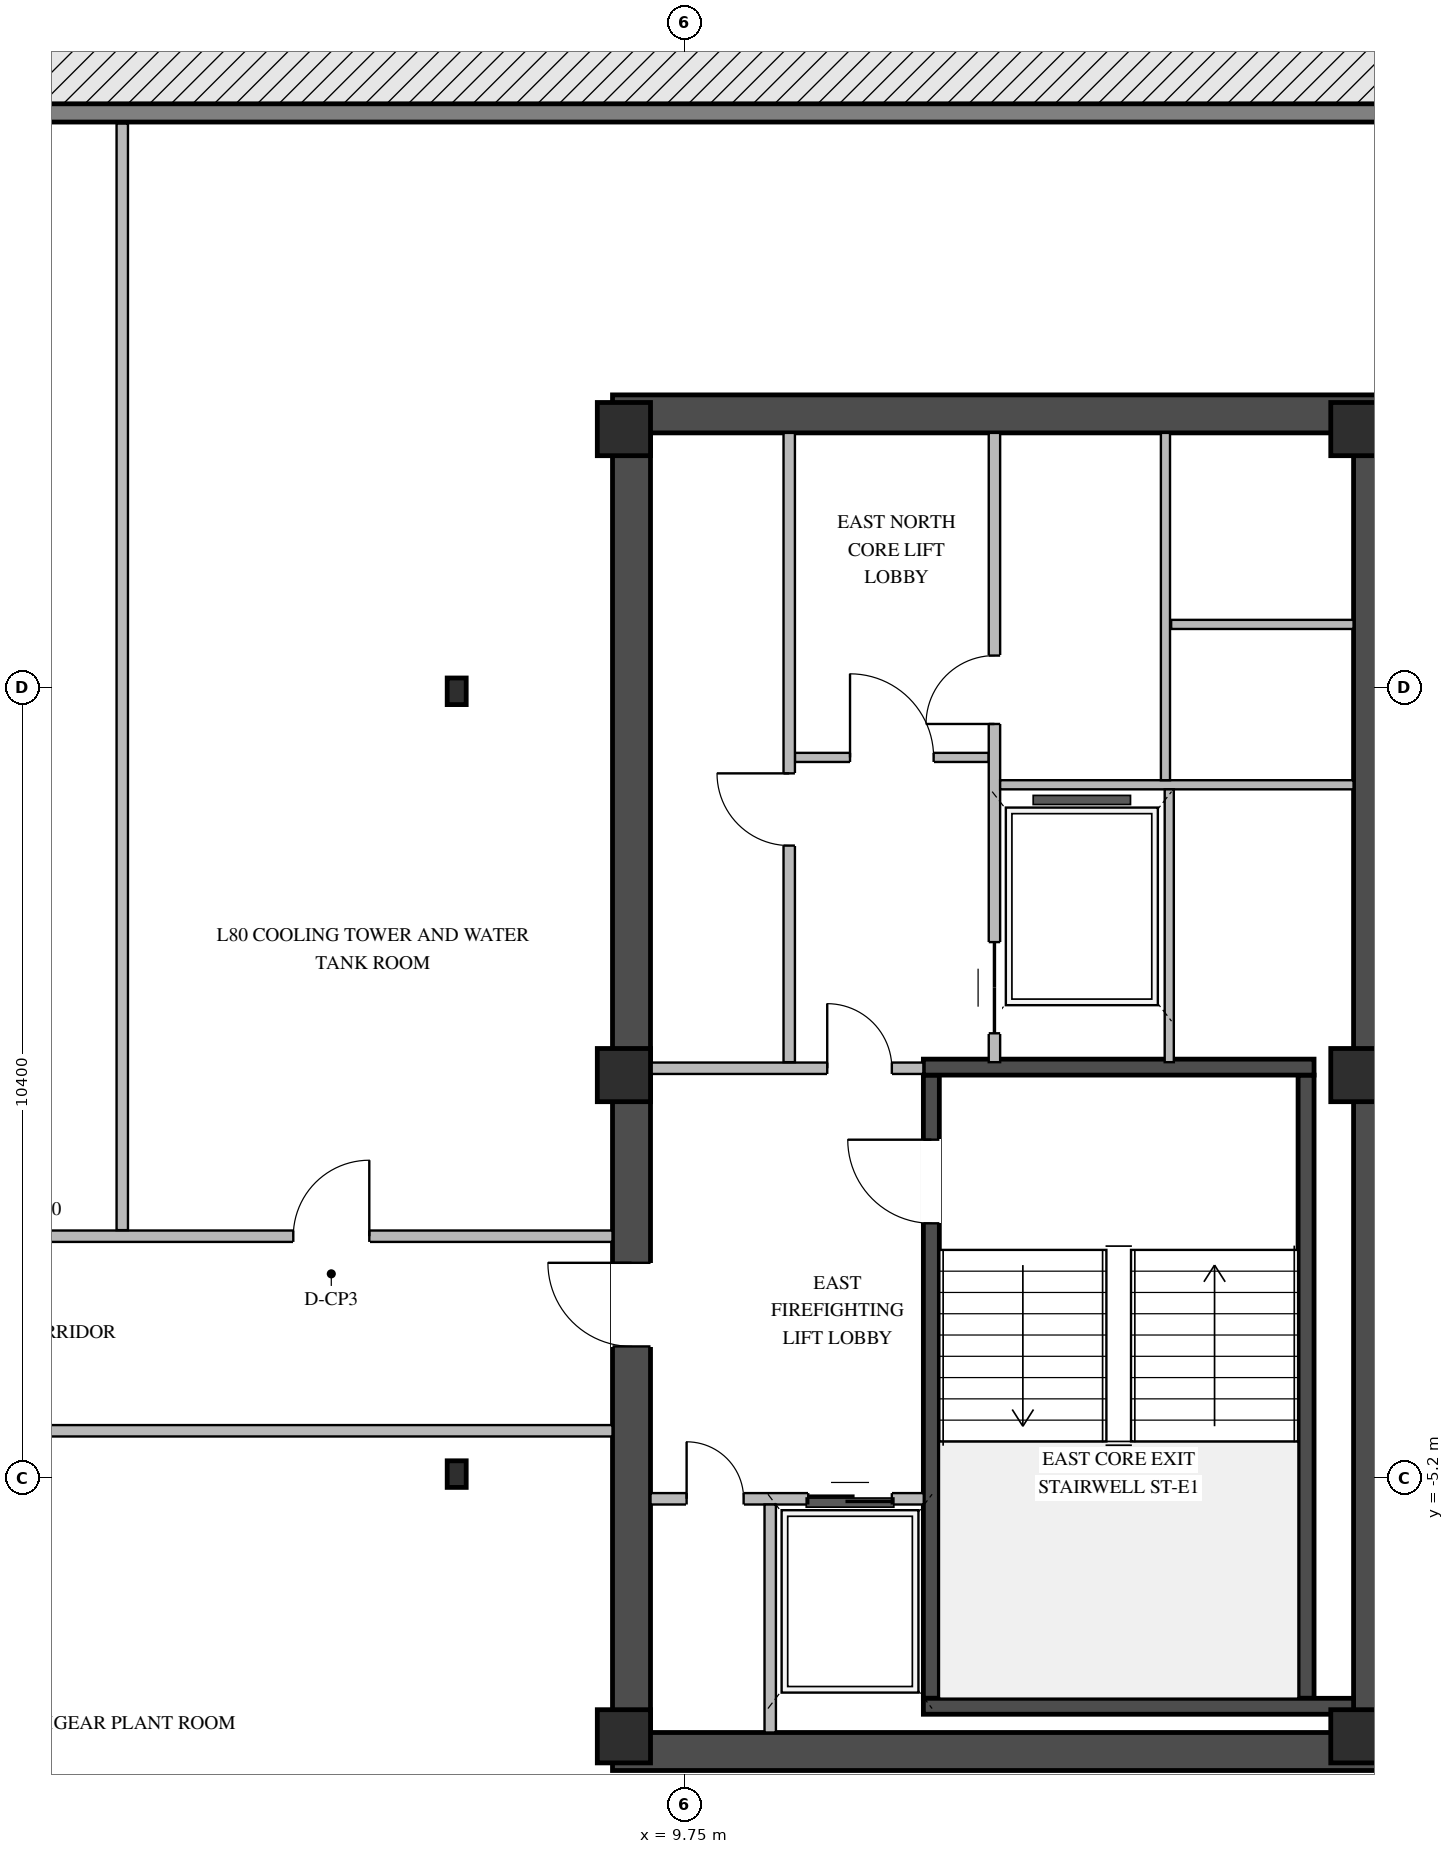
"""IFC4 building model, lengths in metres.
Left out: names, types, materials, properties, quantities, classifications, styles, units other than length and angle.
Written with IfcOpenShell. Run it as: python <this file> out.ifc"""

import sys

from ifc_helpers import new_model, si_unit, direction, frame, frame_2d, origin, origin_2d, place, context, subcontext, project, spatial, rectangle, i_section, extrude, element, fill, save


model = new_model("IFC4")
c1 = context("Model", 3, precision=1e-05, world=origin(), true_north=direction((0.0, 1.0)))
c2 = subcontext(c1, "Body", "Model", "MODEL_VIEW")
j1 = project(units=[si_unit("LENGTHUNIT", "METRE"), si_unit("PLANEANGLEUNIT", "RADIAN")], contexts=[c1])
p1 = place(None, origin())
s1 = spatial("IfcSite", under=j1, at=p1, CompositionType="ELEMENT")
p2 = place(p1, origin())
s2 = spatial("IfcBuilding", under=s1, at=p2, CompositionType="ELEMENT")
p3 = place(p2, frame((0.0, 0.0, 294.15)))
s3 = spatial("IfcBuildingStorey", under=s2, at=p3, CompositionType="ELEMENT", Elevation=294.15)
for number, where, z_axis, x_axis in (
    (1, (8.8, -8.8, 0.0), (0.0, 0.0, 1.0), (1.0, 0.0, 0.0)),
    (2, (8.8, 8.8, 0.0), (0.0, 0.0, 1.0), (1.0, 0.0, 0.0)),
):
    element("IfcWall", number, at=place(p3, frame(where, z_axis=z_axis, x_axis=x_axis)), inside=s3, PredefinedType="SHEAR", context=c2, shape_type="SweptSolid", body=[
        extrude(rectangle(XDim=10.25, YDim=0.5, at=frame_2d((5.125, 0.0))), origin(), (0.0, 0.0, 1.0), 3.35),
    ])
p4 = place(p3, frame((9.05, -8.55, 0.0), z_axis=(0.0, 0.0, 1.0), x_axis=(0.0, 1.0, 0.0)))
e3 = element("IfcWall", 3, at=p4, inside=s3, PredefinedType="SHEAR", context=c2, shape_type="SweptSolid", body=[
    extrude(rectangle(XDim=17.1, YDim=0.5, at=frame_2d((8.55, 0.0))), origin(), (0.0, 0.0, 1.0), 3.35),
])
p5 = place(p4, frame((5.08, 0.0, 0.0)))
e4 = element("IfcOpeningElement", 4, at=p5, cuts=e3, PredefinedType="OPENING", context=c2, shape_type="SweptSolid", body=[
    extrude(rectangle(XDim=1.1, YDim=2.08, at=frame_2d((0.55, 1.04))), frame((0.0, 0.26, 0.0), z_axis=(0.0, -1.0, 0.0), x_axis=(1.0, 0.0, 0.0)), (0.0, 0.0, 1.0), 0.52),
])
p6 = place(p3, frame((18.8, -8.55, 0.0), z_axis=(0.0, 0.0, 1.0), x_axis=(0.0, 1.0, 0.0)))
e5 = element("IfcWall", 5, at=p6, inside=s3, PredefinedType="SHEAR", context=c2, shape_type="SweptSolid", body=[
    extrude(rectangle(XDim=17.1, YDim=0.5, at=frame_2d((8.55, 0.0))), origin(), (0.0, 0.0, 1.0), 3.35),
])
p7 = place(p3, frame((12.995, -8.1, 0.0), z_axis=(0.0, 0.0, 1.0), x_axis=(0.0, 1.0, 0.0)))
e6 = element("IfcWall", 6, at=p7, inside=s3, PredefinedType="SHEAR", context=c2, shape_type="SweptSolid", body=[
    extrude(rectangle(XDim=8.2, YDim=0.21, at=frame_2d((4.1, 0.0))), origin(), (0.0, 0.0, 1.0), 3.35),
])
p8 = place(p7, frame((6.25, 0.0, 0.0)))
e7 = element("IfcOpeningElement", 7, at=p8, cuts=e6, PredefinedType="OPENING", context=c2, shape_type="SweptSolid", body=[
    extrude(rectangle(XDim=1.1, YDim=2.15, at=frame_2d((0.55, 1.075))), frame((0.0, 0.115, 0.0), z_axis=(0.0, -1.0, 0.0), x_axis=(1.0, 0.0, 0.0)), (0.0, 0.0, 1.0), 0.23),
])
p9 = place(p3, frame((17.925, -8.1, 0.0), z_axis=(0.0, 0.0, 1.0), x_axis=(0.0, 1.0, 0.0)))
e8 = element("IfcWall", 8, at=p9, inside=s3, PredefinedType="SHEAR", context=c2, shape_type="SweptSolid", body=[
    extrude(rectangle(XDim=8.2, YDim=0.21, at=frame_2d((4.1, 0.0))), origin(), (0.0, 0.0, 1.0), 3.35),
])
p10 = place(p3, frame((12.89, -8.205, 0.0), z_axis=(0.0, 0.0, 1.0), x_axis=(1.0, 0.0, 0.0)))
e9 = element("IfcWall", 9, at=p10, inside=s3, PredefinedType="SHEAR", context=c2, shape_type="SweptSolid", body=[
    extrude(rectangle(XDim=5.66, YDim=0.21, at=frame_2d((2.83, 0.0))), origin(), (0.0, 0.0, 1.0), 3.35),
])
p11 = place(p3, frame((18.03, 0.205, 0.0), z_axis=(0.0, 0.0, 1.0), x_axis=(-1.0, 0.0, 0.0)))
e10 = element("IfcWall", 10, at=p11, inside=s3, PredefinedType="SHEAR", context=c2, shape_type="SweptSolid", body=[
    extrude(rectangle(XDim=5.14, YDim=0.21, at=frame_2d((2.57, 0.0))), origin(), (0.0, 0.0, 1.0), 3.35),
])
for number, where, z_axis, x_axis in (
    (11, (8.95, -8.6, 0.0), (0.0, 0.0, 1.0), (1.0, 0.0, 0.0)),
    (12, (8.95, 0.1, 0.0), (0.0, 0.0, 1.0), (1.0, 0.0, 0.0)),
    (13, (8.95, 8.6, 0.0), (0.0, 0.0, 1.0), (1.0, 0.0, 0.0)),
    (14, (18.6, -8.6, 0.0), (0.0, 0.0, 1.0), (1.0, 0.0, 0.0)),
    (15, (18.6, 0.1, 0.0), (0.0, 0.0, 1.0), (1.0, 0.0, 0.0)),
    (16, (18.6, 8.6, 0.0), (0.0, 0.0, 1.0), (1.0, 0.0, 0.0)),
):
    element("IfcColumn", number, at=place(p3, frame(where, z_axis=z_axis, x_axis=x_axis)), inside=s3, PredefinedType="COLUMN", context=c2, shape_type="SweptSolid", body=[
        extrude(rectangle(XDim=0.7, YDim=0.7, at=origin_2d()), origin(), (0.0, 0.0, 1.0), 3.6),
    ])
for number, where, z_axis, x_axis in (
    (17, (6.75, -5.15, 0.0), (0.0, 0.0, 1.0), (1.0, 0.0, 0.0)),
    (18, (6.75, 5.15, 0.0), (0.0, 0.0, 1.0), (1.0, 0.0, 0.0)),
):
    element("IfcColumn", number, at=place(p3, frame(where, z_axis=z_axis, x_axis=x_axis)), inside=s3, PredefinedType="COLUMN", context=c2, shape_type="SweptSolid", body=[
        extrude(i_section(OverallWidth=0.25, OverallDepth=0.35, WebThickness=0.01, FlangeThickness=0.012, at=origin_2d()), origin(), (0.0, 0.0, 1.0), 3.6),
    ])
p12 = place(p3, frame((23.96, 12.76, 0.0), z_axis=(0.0, 0.0, 1.0), x_axis=(-1.0, 0.0, 0.0)))
e19 = element("IfcWall", 19, at=p12, inside=s3, PredefinedType="STANDARD", context=c2, shape_type="SweptSolid", body=[
    extrude(rectangle(XDim=44.92, YDim=0.24, at=frame_2d((22.46, 0.0))), origin(), (0.0, 0.0, 1.0), 3.33),
])
p13 = place(p3, frame((9.3, -5.475, 0.0), z_axis=(0.0, 0.0, 1.0), x_axis=(1.0, 0.0, 0.0)))
e20 = element("IfcWall", 20, at=p13, inside=s3, PredefinedType="STANDARD", context=c2, shape_type="SweptSolid", body=[
    extrude(rectangle(XDim=3.595, YDim=0.15, at=frame_2d((1.797, 0.0))), origin(), (0.0, 0.0, 1.0), 3.33),
])
p14 = place(p13, frame((2.075, 0.0, 0.0)))
e21 = element("IfcOpeningElement", 21, at=p14, cuts=e20, PredefinedType="OPENING", context=c2, shape_type="SweptSolid", body=[
    extrude(rectangle(XDim=1.1, YDim=2.15, at=frame_2d((0.55, 1.075))), frame((0.0, 0.085, 0.0), z_axis=(0.0, -1.0, 0.0), x_axis=(1.0, 0.0, 0.0)), (0.0, 0.0, 1.0), 0.17),
])
p15 = place(p13, frame((0.475, 0.0, 0.0)))
e22 = element("IfcOpeningElement", 22, at=p15, cuts=e20, PredefinedType="OPENING", context=c2, shape_type="SweptSolid", body=[
    extrude(rectangle(XDim=0.75, YDim=2.05, at=frame_2d((0.375, 1.025))), frame((0.0, 0.085, 0.0), z_axis=(0.0, -1.0, 0.0), x_axis=(1.0, 0.0, 0.0)), (0.0, 0.0, 1.0), 0.17),
])
p16 = place(p3, frame((10.875, -8.55, 0.0), z_axis=(0.0, 0.0, 1.0), x_axis=(0.0, 1.0, 0.0)))
e23 = element("IfcWall", 23, at=p16, inside=s3, PredefinedType="STANDARD", context=c2, shape_type="SweptSolid", body=[
    extrude(rectangle(XDim=3.0, YDim=0.15, at=frame_2d((1.5, 0.0))), origin(), (0.0, 0.0, 1.0), 3.33),
])
p17 = place(p3, frame((9.3, 0.19, 0.0), z_axis=(0.0, 0.0, 1.0), x_axis=(1.0, 0.0, 0.0)))
e24 = element("IfcWall", 24, at=p17, inside=s3, PredefinedType="STANDARD", context=c2, shape_type="SweptSolid", body=[
    extrude(rectangle(XDim=3.59, YDim=0.15, at=frame_2d((1.795, 0.0))), origin(), (0.0, 0.0, 1.0), 2.825),
])
p18 = place(p17, frame((2.325, 0.0, 0.0)))
e25 = element("IfcOpeningElement", 25, at=p18, cuts=e24, PredefinedType="OPENING", context=c2, shape_type="SweptSolid", body=[
    extrude(rectangle(XDim=0.85, YDim=2.04, at=frame_2d((0.425, 1.02))), frame((0.0, 0.085, 0.0), z_axis=(0.0, -1.0, 0.0), x_axis=(1.0, 0.0, 0.0)), (0.0, 0.0, 1.0), 0.17),
])
p19 = place(p3, frame((11.2, 4.28, 0.0), z_axis=(0.0, 0.0, 1.0), x_axis=(1.0, 0.0, 0.0)))
e26 = element("IfcWall", 26, at=p19, inside=s3, PredefinedType="STANDARD", context=c2, shape_type="SweptSolid", body=[
    extrude(rectangle(XDim=2.55, YDim=0.12, at=frame_2d((1.275, 0.0))), origin(), (0.0, 0.0, 1.0), 3.33),
])
p20 = place(p19, frame((0.725, 0.0, 0.0)))
e27 = element("IfcOpeningElement", 27, at=p20, cuts=e26, PredefinedType="OPENING", context=c2, shape_type="SweptSolid", body=[
    extrude(rectangle(XDim=1.1, YDim=2.1, at=frame_2d((0.55, 1.05))), frame((0.0, 0.07, 0.0), z_axis=(0.0, -1.0, 0.0), x_axis=(1.0, 0.0, 0.0)), (0.0, 0.0, 1.0), 0.14),
])
p21 = place(p3, frame((11.125, 0.27, 0.0), z_axis=(0.0, 0.0, 1.0), x_axis=(0.0, 1.0, 0.0)))
e28 = element("IfcWall", 28, at=p21, inside=s3, PredefinedType="STANDARD", context=c2, shape_type="SweptSolid", body=[
    extrude(rectangle(XDim=8.28, YDim=0.15, at=frame_2d((4.14, 0.0))), origin(), (0.0, 0.0, 1.0), 3.33),
])
p22 = place(p21, frame((2.85, 0.0, 0.0)))
e29 = element("IfcOpeningElement", 29, at=p22, cuts=e28, PredefinedType="OPENING", context=c2, shape_type="SweptSolid", body=[
    extrude(rectangle(XDim=0.95, YDim=2.05, at=frame_2d((0.475, 1.025))), frame((0.0, 0.085, 0.0), z_axis=(0.0, -1.0, 0.0), x_axis=(1.0, 0.0, 0.0)), (0.0, 0.0, 1.0), 0.17),
])
p23 = place(p3, frame((13.825, 0.27, 0.0), z_axis=(0.0, 0.0, 1.0), x_axis=(0.0, 1.0, 0.0)))
e30 = element("IfcWall", 30, at=p23, inside=s3, PredefinedType="STANDARD", context=c2, shape_type="SweptSolid", body=[
    extrude(rectangle(XDim=8.28, YDim=0.15, at=frame_2d((4.14, 0.0))), origin(), (0.0, 0.0, 1.0), 3.33),
])
p24 = place(p23, frame((4.45, 0.0, 0.0)))
e31 = element("IfcOpeningElement", 31, at=p24, cuts=e30, PredefinedType="OPENING", context=c2, shape_type="SweptSolid", body=[
    extrude(rectangle(XDim=0.9, YDim=2.05, at=frame_2d((0.45, 1.025))), frame((0.0, 0.085, 0.0), z_axis=(0.0, -1.0, 0.0), x_axis=(1.0, 0.0, 0.0)), (0.0, 0.0, 1.0), 0.17),
])
p25 = place(p23, frame((0.38, 0.0, 0.0)))
e32 = element("IfcOpeningElement", 32, at=p25, cuts=e30, PredefinedType="OPENING", context=c2, shape_type="SweptSolid", body=[
    extrude(rectangle(XDim=1.2, YDim=2.1, at=frame_2d((0.6, 1.05))), frame((0.0, 0.085, 0.0), z_axis=(0.0, -1.0, 0.0), x_axis=(1.0, 0.0, 0.0)), (0.0, 0.0, 1.0), 0.17),
])
p26 = place(p3, frame((13.9, 3.92, 0.0), z_axis=(0.0, 0.0, 1.0), x_axis=(1.0, 0.0, 0.0)))
e33 = element("IfcWall", 33, at=p26, inside=s3, PredefinedType="STANDARD", context=c2, shape_type="SweptSolid", body=[
    extrude(rectangle(XDim=4.65, YDim=0.12, at=frame_2d((2.325, 0.0))), origin(), (0.0, 0.0, 1.0), 3.33),
])
p27 = place(p3, frame((16.15, 6.03, 0.0), z_axis=(0.0, 0.0, 1.0), x_axis=(1.0, 0.0, 0.0)))
e34 = element("IfcWall", 34, at=p27, inside=s3, PredefinedType="STANDARD", context=c2, shape_type="SweptSolid", body=[
    extrude(rectangle(XDim=2.4, YDim=0.12, at=frame_2d((1.2, 0.0))), origin(), (0.0, 0.0, 1.0), 3.33),
])
p28 = place(p3, frame((16.075, 3.98, 0.0), z_axis=(0.0, 0.0, 1.0), x_axis=(0.0, 1.0, 0.0)))
e35 = element("IfcWall", 35, at=p28, inside=s3, PredefinedType="STANDARD", context=c2, shape_type="SweptSolid", body=[
    extrude(rectangle(XDim=4.57, YDim=0.12, at=frame_2d((2.285, 0.0))), origin(), (0.0, 0.0, 1.0), 3.33),
])
p29 = place(p3, frame((16.125, 0.27, 0.0), z_axis=(0.0, 0.0, 1.0), x_axis=(0.0, 1.0, 0.0)))
e36 = element("IfcWall", 36, at=p29, inside=s3, PredefinedType="STANDARD", context=c2, shape_type="SweptSolid", body=[
    extrude(rectangle(XDim=3.59, YDim=0.12, at=frame_2d((1.795, 0.0))), origin(), (0.0, 0.0, 1.0), 3.33),
])
p30 = place(p3, frame((-8.8, -2.02, 0.0), z_axis=(0.0, 0.0, 1.0), x_axis=(1.0, 0.0, 0.0)))
e37 = element("IfcWall", 37, at=p30, inside=s3, PredefinedType="STANDARD", context=c2, shape_type="SweptSolid", body=[
    extrude(rectangle(XDim=17.6, YDim=0.15, at=frame_2d((8.8, 0.0))), origin(), (0.0, 0.0, 1.0), 3.33),
])
p31 = place(p30, frame((4.6, 0.0, 0.0)))
e38 = element("IfcOpeningElement", 38, at=p31, cuts=e37, PredefinedType="OPENING", context=c2, shape_type="SweptSolid", body=[
    extrude(rectangle(XDim=1.0, YDim=2.02, at=frame_2d((0.5, 1.01))), frame((0.0, 0.085, 0.0), z_axis=(0.0, -1.0, 0.0), x_axis=(1.0, 0.0, 0.0)), (0.0, 0.0, 1.0), 0.17),
])
p32 = place(p30, frame((13.4, 0.0, 0.0)))
e39 = element("IfcOpeningElement", 39, at=p32, cuts=e37, PredefinedType="OPENING", context=c2, shape_type="SweptSolid", body=[
    extrude(rectangle(XDim=1.0, YDim=2.02, at=frame_2d((0.5, 1.01))), frame((0.0, 0.085, 0.0), z_axis=(0.0, -1.0, 0.0), x_axis=(1.0, 0.0, 0.0)), (0.0, 0.0, 1.0), 0.17),
])
p33 = place(p3, frame((2.35, -1.94, 0.0), z_axis=(0.0, 0.0, 1.0), x_axis=(0.0, 1.0, 0.0)))
e40 = element("IfcWall", 40, at=p33, inside=s3, PredefinedType="STANDARD", context=c2, shape_type="SweptSolid", body=[
    extrude(rectangle(XDim=14.56, YDim=0.15, at=frame_2d((7.28, 0.0))), origin(), (0.0, 0.0, 1.0), 3.33),
])
p34 = place(p3, frame((-8.8, -4.58, 0.0), z_axis=(0.0, 0.0, 1.0), x_axis=(1.0, 0.0, 0.0)))
e41 = element("IfcWall", 41, at=p34, inside=s3, PredefinedType="STANDARD", context=c2, shape_type="SweptSolid", body=[
    extrude(rectangle(XDim=17.6, YDim=0.15, at=frame_2d((8.8, 0.0))), origin(), (0.0, 0.0, 1.0), 3.33),
])
p35 = place(p34, frame((4.6, 0.0, 0.0)))
e42 = element("IfcOpeningElement", 42, at=p35, cuts=e41, PredefinedType="OPENING", context=c2, shape_type="SweptSolid", body=[
    extrude(rectangle(XDim=1.0, YDim=2.02, at=frame_2d((0.5, 1.01))), frame((0.0, 0.085, 0.0), z_axis=(0.0, -1.0, 0.0), x_axis=(1.0, 0.0, 0.0)), (0.0, 0.0, 1.0), 0.17),
])
p36 = place(p8, origin())
e43 = element("IfcDoor", 43, at=p36, inside=s3, OperationType="SINGLE_SWING_RIGHT", PredefinedType="DOOR", context=c2, shape_type="SweptSolid", body=[
    extrude(rectangle(XDim=1.1, YDim=2.15, at=frame_2d((0.55, 1.075))), frame((0.0, 0.025, 0.0), z_axis=(0.0, -1.0, 0.0), x_axis=(1.0, 0.0, 0.0)), (0.0, 0.0, 1.0), 0.05),
])
fill(e7, e43)
p37 = place(p14, origin())
e44 = element("IfcDoor", 44, at=p37, inside=s3, OperationType="DOUBLE_DOOR_SLIDING", PredefinedType="DOOR", context=c2, shape_type="SweptSolid", body=[
    extrude(rectangle(XDim=1.1, YDim=2.15, at=frame_2d((0.55, 1.075))), frame((0.0, 0.025, 0.0), z_axis=(0.0, -1.0, 0.0), x_axis=(1.0, 0.0, 0.0)), (0.0, 0.0, 1.0), 0.05),
])
fill(e21, e44)
p38 = place(p15, origin())
e45 = element("IfcDoor", 45, at=p38, inside=s3, OperationType="SINGLE_SWING_LEFT", PredefinedType="DOOR", context=c2, shape_type="SweptSolid", body=[
    extrude(rectangle(XDim=0.75, YDim=2.05, at=frame_2d((0.375, 1.025))), frame((0.0, 0.025, 0.0), z_axis=(0.0, -1.0, 0.0), x_axis=(1.0, 0.0, 0.0)), (0.0, 0.0, 1.0), 0.05),
])
fill(e22, e45)
p39 = place(p18, origin())
e46 = element("IfcDoor", 46, at=p39, inside=s3, OperationType="SINGLE_SWING_LEFT", PredefinedType="DOOR", context=c2, shape_type="SweptSolid", body=[
    extrude(rectangle(XDim=0.85, YDim=2.04, at=frame_2d((0.425, 1.02))), frame((0.0, 0.025, 0.0), z_axis=(0.0, -1.0, 0.0), x_axis=(1.0, 0.0, 0.0)), (0.0, 0.0, 1.0), 0.05),
])
fill(e25, e46)
p40 = place(p5, origin())
e47 = element("IfcDoor", 47, at=p40, inside=s3, OperationType="SINGLE_SWING_RIGHT", PredefinedType="DOOR", context=c2, shape_type="SweptSolid", body=[
    extrude(rectangle(XDim=1.1, YDim=2.08, at=frame_2d((0.55, 1.04))), frame((0.0, -0.155, 0.0), z_axis=(0.0, -1.0, 0.0), x_axis=(1.0, 0.0, 0.0)), (0.0, 0.0, 1.0), 0.05),
])
fill(e4, e47)
p41 = place(p20, origin())
e48 = element("IfcDoor", 48, at=p41, inside=s3, OperationType="SINGLE_SWING_LEFT", PredefinedType="DOOR", context=c2, shape_type="SweptSolid", body=[
    extrude(rectangle(XDim=1.1, YDim=2.1, at=frame_2d((0.55, 1.05))), frame((0.0, 0.025, 0.0), z_axis=(0.0, -1.0, 0.0), x_axis=(1.0, 0.0, 0.0)), (0.0, 0.0, 1.0), 0.05),
])
fill(e27, e48)
p42 = place(p22, origin())
e49 = element("IfcDoor", 49, at=p42, inside=s3, OperationType="SINGLE_SWING_RIGHT", PredefinedType="DOOR", context=c2, shape_type="SweptSolid", body=[
    extrude(rectangle(XDim=0.95, YDim=2.05, at=frame_2d((0.475, 1.025))), frame((0.0, 0.025, 0.0), z_axis=(0.0, -1.0, 0.0), x_axis=(1.0, 0.0, 0.0)), (0.0, 0.0, 1.0), 0.05),
])
fill(e29, e49)
p43 = place(p24, origin())
e50 = element("IfcDoor", 50, at=p43, inside=s3, OperationType="SINGLE_SWING_LEFT", PredefinedType="DOOR", context=c2, shape_type="SweptSolid", body=[
    extrude(rectangle(XDim=0.9, YDim=2.05, at=frame_2d((0.45, 1.025))), frame((0.0, 0.025, 0.0), z_axis=(0.0, -1.0, 0.0), x_axis=(1.0, 0.0, 0.0)), (0.0, 0.0, 1.0), 0.05),
])
fill(e31, e50)
p44 = place(p25, origin())
e51 = element("IfcDoor", 51, at=p44, inside=s3, OperationType="DOUBLE_DOOR_SLIDING", PredefinedType="DOOR", context=c2, shape_type="SweptSolid", body=[
    extrude(rectangle(XDim=1.2, YDim=2.1, at=frame_2d((0.6, 1.05))), frame((0.0, 0.025, 0.0), z_axis=(0.0, -1.0, 0.0), x_axis=(1.0, 0.0, 0.0)), (0.0, 0.0, 1.0), 0.05),
])
fill(e32, e51)
p45 = place(p32, origin())
e52 = element("IfcDoor", 52, at=p45, inside=s3, OperationType="SINGLE_SWING_RIGHT", PredefinedType="DOOR", context=c2, shape_type="SweptSolid", body=[
    extrude(rectangle(XDim=1.0, YDim=2.02, at=frame_2d((0.5, 1.01))), frame((0.0, 0.025, 0.0), z_axis=(0.0, -1.0, 0.0), x_axis=(1.0, 0.0, 0.0)), (0.0, 0.0, 1.0), 0.05),
])
fill(e39, e52)
save(model, sys.argv[1])
